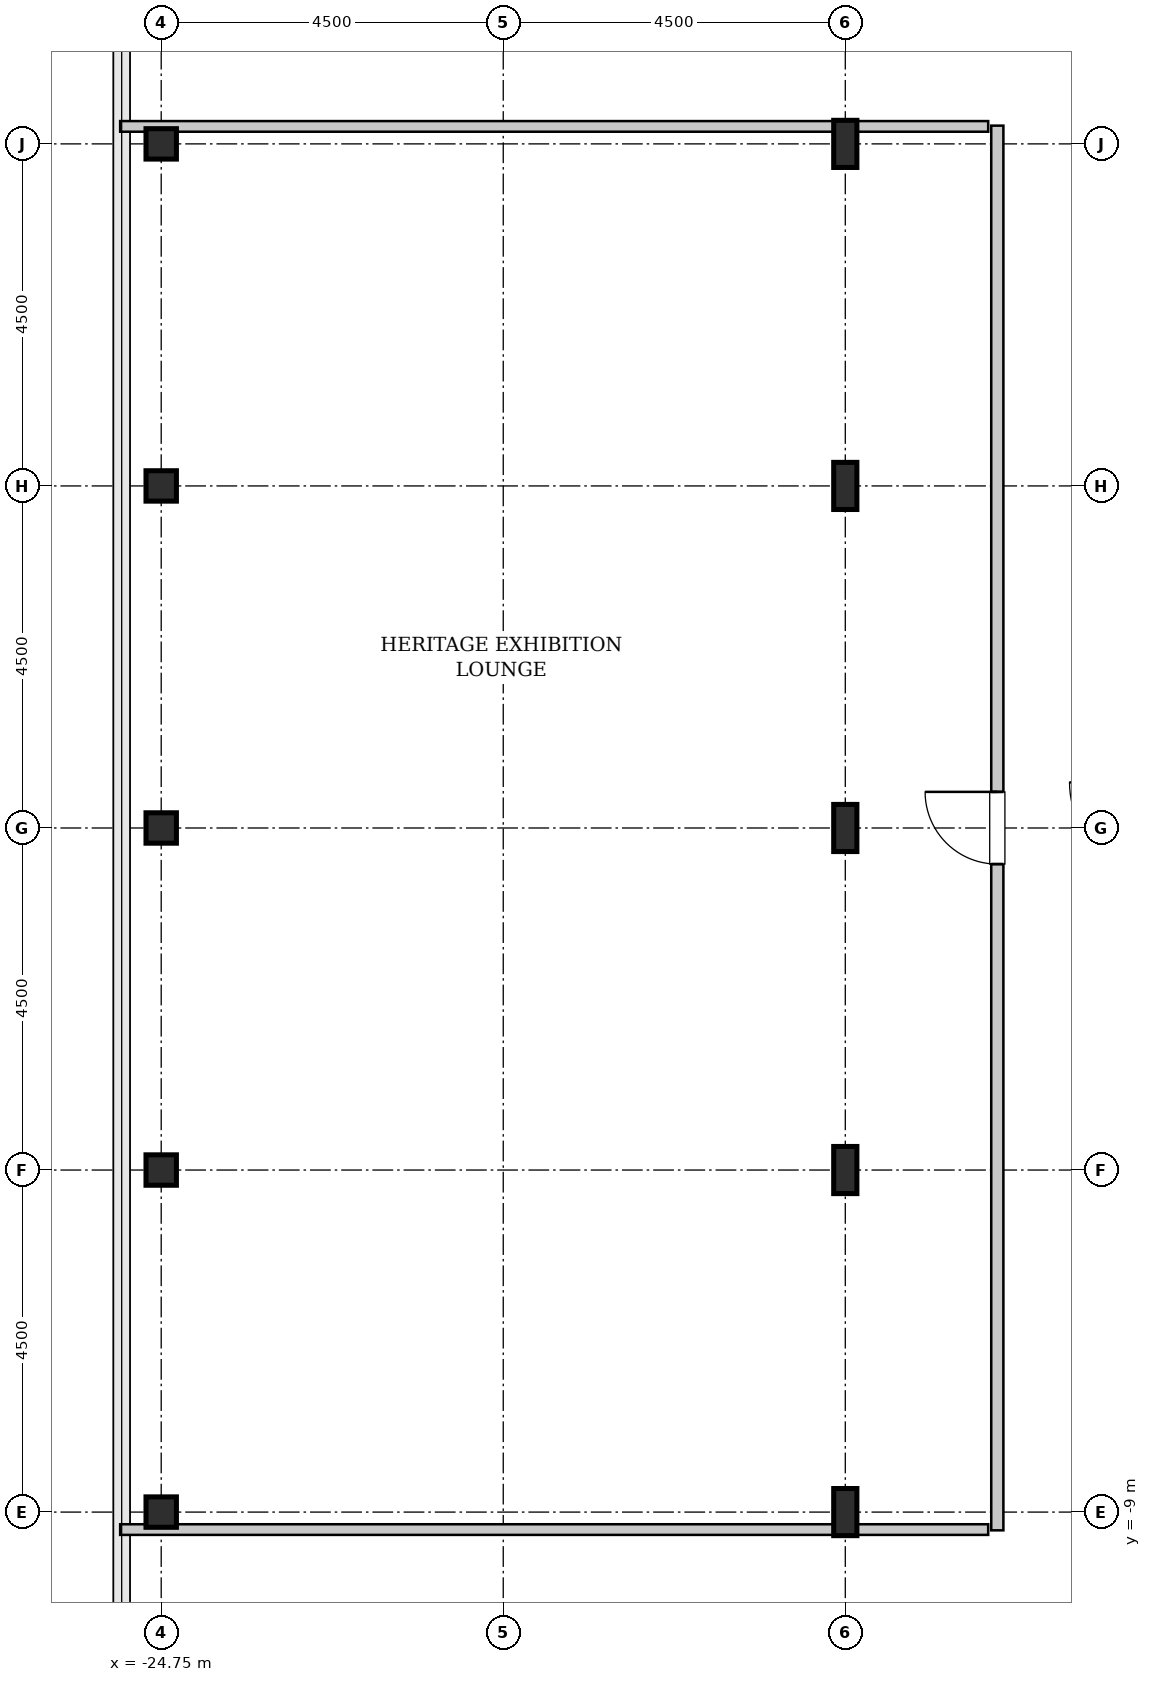
"""IFC4 building model, lengths in metres.
Left out: names, types, materials, properties, quantities, classifications, styles, units other than length and angle.
Written with IfcOpenShell. Run it as: python <this file> out.ifc"""

import sys

from ifc_helpers import new_model, si_unit, direction, frame, frame_2d, origin, origin_2d, place, context, subcontext, project, spatial, rectangle, hollow_rectangle, i_section, extrude, source, transform, mapped, element, fill, save


model = new_model("IFC4")
c1 = context("Model", 3, precision=1e-05, world=origin(), true_north=direction((0.0, 1.0)))
c2 = subcontext(c1, "Body", "Model", "MODEL_VIEW")
j1 = project(units=[si_unit("LENGTHUNIT", "METRE"), si_unit("PLANEANGLEUNIT", "RADIAN")], contexts=[c1])
p1 = place(None, origin())
s1 = spatial("IfcSite", under=j1, at=p1, CompositionType="ELEMENT")
p2 = place(p1, origin())
s2 = spatial("IfcBuilding", under=s1, at=p2, CompositionType="ELEMENT")
p3 = place(p2, frame((0.0, 0.0, 353.8)))
s3 = spatial("IfcBuildingStorey", under=s2, at=p3, CompositionType="ELEMENT", Elevation=353.8)
m1 = source(origin(), c2, "Body", "SweptSolid", [
    extrude(hollow_rectangle(XDim=0.4, YDim=0.4, WallThickness=0.02, InnerFilletRadius=0.02, OuterFilletRadius=0.04, at=origin_2d()), origin(), (0.0, 0.0, 1.0), 4.8),
])
for number, where, z_axis, x_axis in (
    (1, (-24.75, -9.0, 0.0), (0.0, 0.0, 1.0), (1.0, 0.0, 0.0)),
    (2, (-24.75, -4.5, 0.0), (0.0, 0.0, 1.0), (1.0, 0.0, 0.0)),
    (3, (-24.75, 0.0, 0.0), (0.0, 0.0, 1.0), (1.0, 0.0, 0.0)),
    (4, (-24.75, 4.5, 0.0), (0.0, 0.0, 1.0), (1.0, 0.0, 0.0)),
    (5, (-24.75, 9.0, 0.0), (0.0, 0.0, 1.0), (1.0, 0.0, 0.0)),
):
    element("IfcColumn", number, at=place(p3, frame(where, z_axis=z_axis, x_axis=x_axis)), inside=s3, PredefinedType="COLUMN", context=c2, shape_type="MappedRepresentation", body=[
        mapped(m1, transform((0.0, 0.0, 0.0), x_axis=(1.0, 0.0, 0.0), y_axis=(0.0, 1.0, 0.0), z_axis=(0.0, 0.0, 1.0), scale=1.0)),
    ])
m2 = source(origin(), c2, "Body", "SweptSolid", [
    extrude(i_section(OverallWidth=0.305, OverallDepth=0.62, WebThickness=0.021, FlangeThickness=0.04, FilletRadius=0.027, at=origin_2d()), origin(), (0.0, 0.0, 1.0), 4.8),
])
for number, where, z_axis, x_axis in (
    (6, (-15.75, -9.0, 0.0), (0.0, 0.0, 1.0), (1.0, 0.0, 0.0)),
    (7, (-15.75, -4.5, 0.0), (0.0, 0.0, 1.0), (1.0, 0.0, 0.0)),
    (8, (-15.75, 0.0, 0.0), (0.0, 0.0, 1.0), (1.0, 0.0, 0.0)),
    (9, (-15.75, 4.5, 0.0), (0.0, 0.0, 1.0), (1.0, 0.0, 0.0)),
    (10, (-15.75, 9.0, 0.0), (0.0, 0.0, 1.0), (1.0, 0.0, 0.0)),
):
    element("IfcColumn", number, at=place(p3, frame(where, z_axis=z_axis, x_axis=x_axis)), inside=s3, PredefinedType="COLUMN", context=c2, shape_type="MappedRepresentation", body=[
        mapped(m2, transform((0.0, 0.0, 0.0), x_axis=(1.0, 0.0, 0.0), y_axis=(0.0, 1.0, 0.0), z_axis=(0.0, 0.0, 1.0), scale=1.0)),
    ])
m3 = source(origin(), c2, "Body", "SweptSolid", [
    extrude(rectangle(XDim=18.48, YDim=0.16, at=frame_2d((9.24, 0.0))), origin(), (0.0, 0.0, 1.0), 4.485),
])
p4 = place(p3, frame((-13.75, -9.24, 0.0), z_axis=(0.0, 0.0, 1.0), x_axis=(0.0, 1.0, 0.0)))
e11 = element("IfcWall", 11, at=p4, inside=s3, PredefinedType="PARTITIONING", context=c2, shape_type="MappedRepresentation", body=[
    mapped(m3, transform((0.0, 0.0, 0.0), x_axis=(1.0, 0.0, 0.0), y_axis=(0.0, 1.0, 0.0), z_axis=(0.0, 0.0, 1.0), scale=1.0)),
])
p5 = place(p4, frame((8.765, 0.0, 0.0)))
e12 = element("IfcOpeningElement", 12, at=p5, cuts=e11, PredefinedType="OPENING", context=c2, shape_type="SweptSolid", body=[
    extrude(rectangle(XDim=0.95, YDim=2.1, at=frame_2d((0.475, 1.05))), frame((0.0, 0.09, 0.0), z_axis=(0.0, -1.0, 0.0), x_axis=(1.0, 0.0, 0.0)), (0.0, 0.0, 1.0), 0.18),
])
m4 = source(origin(), c2, "Body", "SweptSolid", [
    extrude(rectangle(XDim=11.42, YDim=0.14, at=frame_2d((5.71, 0.0))), origin(), (0.0, 0.0, 1.0), 3.925),
])
for number, where, z_axis, x_axis in (
    (13, (-25.29, -9.23, 0.0), (0.0, 0.0, 1.0), (1.0, 0.0, 0.0)),
    (14, (-25.29, 9.23, 0.0), (0.0, 0.0, 1.0), (1.0, 0.0, 0.0)),
):
    element("IfcWall", number, at=place(p3, frame(where, z_axis=z_axis, x_axis=x_axis)), inside=s3, PredefinedType="PARTITIONING", context=c2, shape_type="MappedRepresentation", body=[
        mapped(m4, transform((0.0, 0.0, 0.0), x_axis=(1.0, 0.0, 0.0), y_axis=(0.0, 1.0, 0.0), z_axis=(0.0, 0.0, 1.0), scale=1.0)),
    ])
m5 = source(origin(), c2, "Body", "SweptSolid", [
    extrude(rectangle(XDim=0.95, YDim=2.1, at=frame_2d((0.475, 1.05))), frame((0.0, 0.025, 0.0), z_axis=(0.0, -1.0, 0.0), x_axis=(1.0, 0.0, 0.0)), (0.0, 0.0, 1.0), 0.05),
])
p6 = place(p5, origin())
e15 = element("IfcDoor", 15, at=p6, inside=s3, OperationType="SINGLE_SWING_RIGHT", PredefinedType="DOOR", context=c2, shape_type="MappedRepresentation", body=[
    mapped(m5, transform((0.0, 0.0, 0.0), x_axis=(1.0, 0.0, 0.0), y_axis=(0.0, 1.0, 0.0), z_axis=(0.0, 0.0, 1.0), scale=1.0)),
])
fill(e12, e15)
save(model, sys.argv[1])
